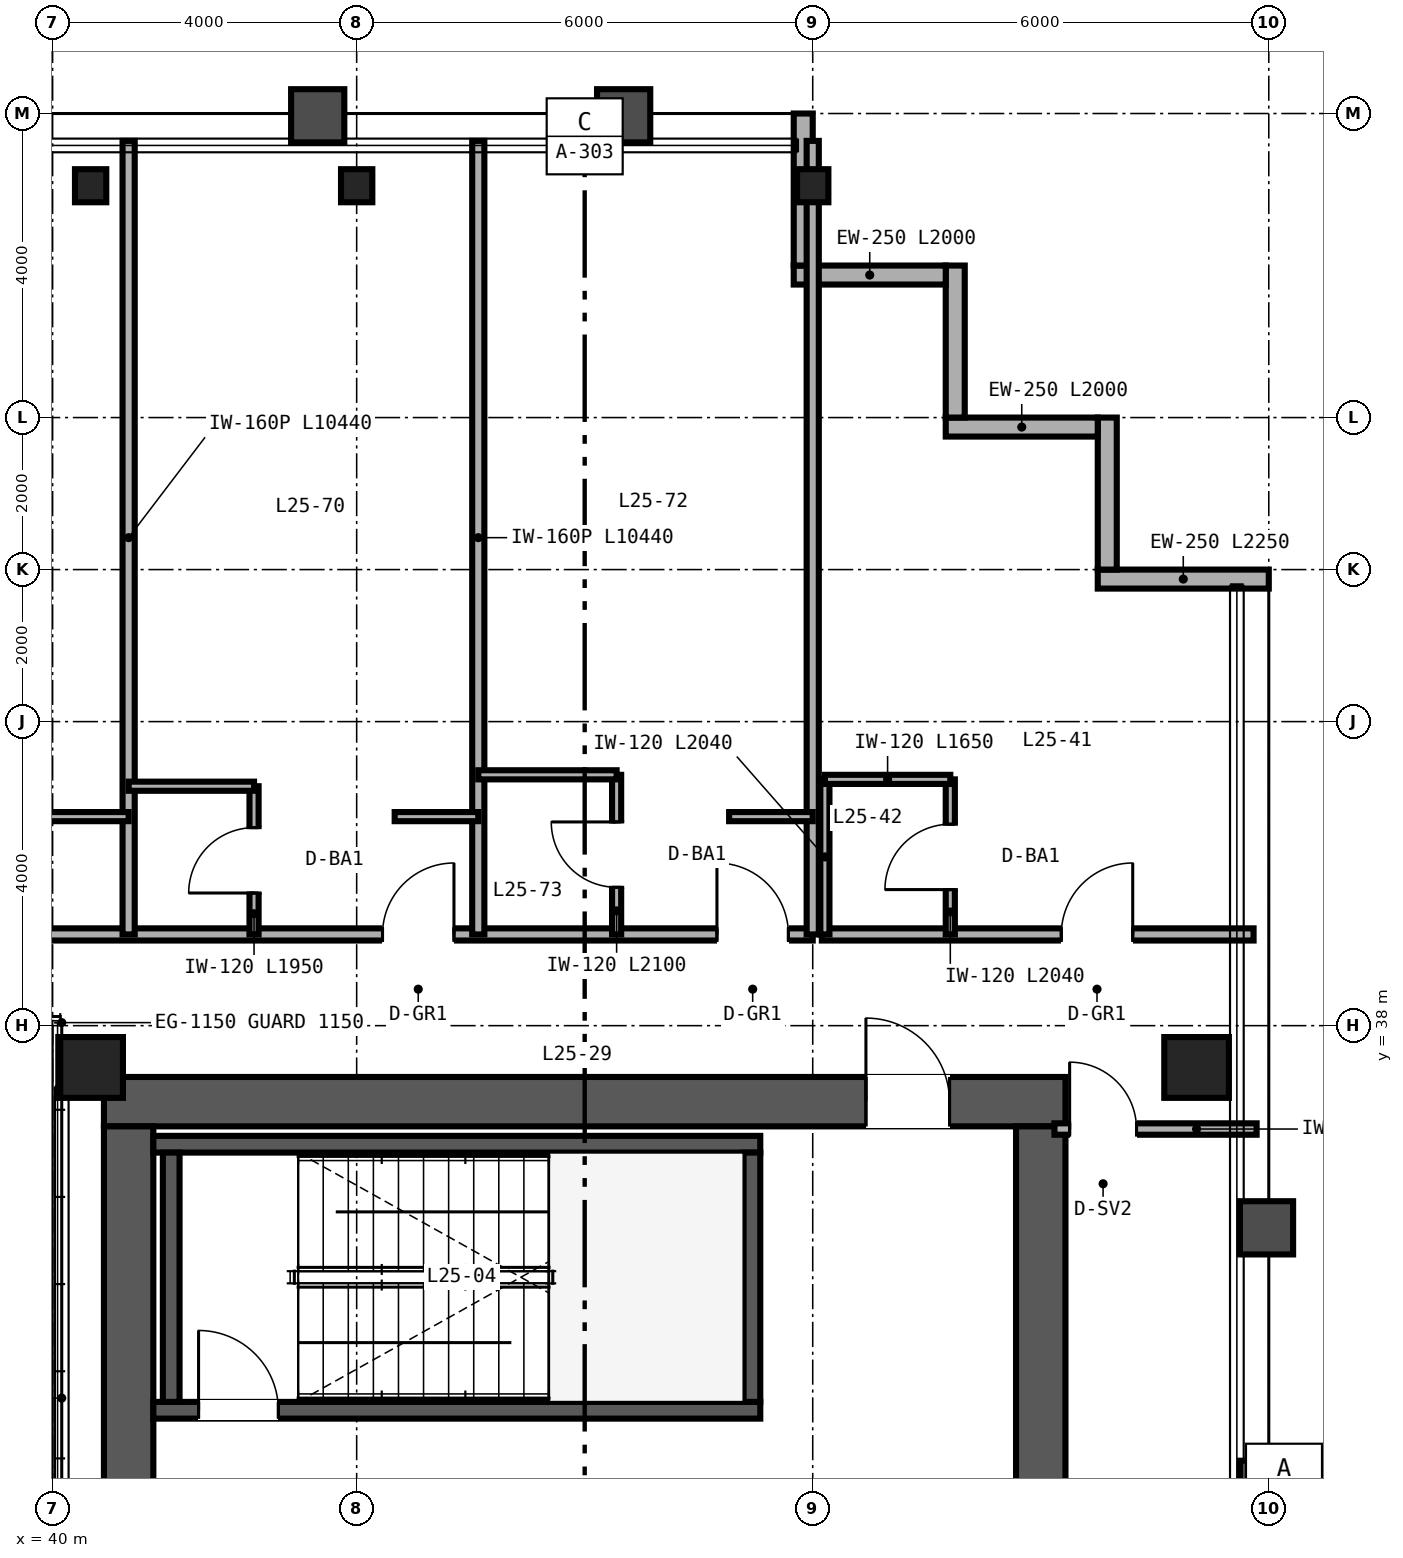
"""IFC4 building model, lengths in metres.
Left out: names, types, materials, properties, quantities, classifications, styles, units other than length and angle.
Written with IfcOpenShell. Run it as: python <this file> out.ifc"""

import sys

from ifc_helpers import new_model, si_unit, direction, frame, frame_2d, origin, origin_2d, place, context, subcontext, project, spatial, rectangle, hollow_rectangle, i_section, extrude, source, transform, mapped, element, fill, save


model = new_model("IFC4")
c1 = context("Model", 3, precision=1e-05, world=origin(), true_north=direction((0.0, 1.0)))
c2 = subcontext(c1, "Body", "Model", "MODEL_VIEW")
j1 = project(units=[si_unit("LENGTHUNIT", "METRE"), si_unit("PLANEANGLEUNIT", "RADIAN")], contexts=[c1])
p1 = place(None, origin())
s1 = spatial("IfcSite", under=j1, at=p1, CompositionType="ELEMENT")
p2 = place(p1, origin())
s2 = spatial("IfcBuilding", under=s1, at=p2, CompositionType="ELEMENT")
p3 = place(p2, frame((0.0, 0.0, 104.4)))
s3 = spatial("IfcBuildingStorey", under=s2, at=p3, CompositionType="ELEMENT", Elevation=104.4)
p4 = place(p3, frame((40.675, 37.0, 0.0), z_axis=(0.0, 0.0, 1.0), x_axis=(1.0, 0.0, 0.0)))
e1 = element("IfcWall", 1, at=p4, inside=s3, PredefinedType="SHEAR", context=c2, shape_type="SweptSolid", body=[
    extrude(rectangle(XDim=12.65, YDim=0.65, at=frame_2d((6.325, 0.0))), origin(), (0.0, 0.0, 1.0), 3.36),
])
p5 = place(p4, frame((10.025, 0.0, 0.0)))
e2 = element("IfcOpeningElement", 2, at=p5, cuts=e1, PredefinedType="OPENING", context=c2, shape_type="SweptSolid", body=[
    extrude(rectangle(XDim=1.1, YDim=2.15, at=frame_2d((0.55, 1.075))), frame((0.0, 0.335, 0.0), z_axis=(0.0, -1.0, 0.0), x_axis=(1.0, 0.0, 0.0)), (0.0, 0.0, 1.0), 0.67),
])
for number, where, z_axis, x_axis in (
    (3, (41.0, 15.325, 0.0), (0.0, 0.0, 1.0), (0.0, 1.0, 0.0)),
    (4, (53.0, 15.325, 0.0), (0.0, 0.0, 1.0), (0.0, 1.0, 0.0)),
):
    element("IfcWall", number, at=place(p3, frame(where, z_axis=z_axis, x_axis=x_axis)), inside=s3, PredefinedType="SHEAR", context=c2, shape_type="SweptSolid", body=[
        extrude(rectangle(XDim=21.35, YDim=0.65, at=frame_2d((10.675, 0.0))), origin(), (0.0, 0.0, 1.0), 3.36),
    ])
p6 = place(p3, frame((41.325, 32.94, 0.0), z_axis=(0.0, 0.0, 1.0), x_axis=(1.0, 0.0, 0.0)))
e5 = element("IfcWall", 5, at=p6, inside=s3, PredefinedType="SHEAR", context=c2, shape_type="SweptSolid", body=[
    extrude(rectangle(XDim=7.985, YDim=0.22, at=frame_2d((3.993, 0.0))), origin(), (0.0, 0.0, 1.0), 3.4),
])
p7 = place(p6, frame((0.595, 0.0, 0.0)))
e6 = element("IfcOpeningElement", 6, at=p7, cuts=e5, PredefinedType="OPENING", context=c2, shape_type="SweptSolid", body=[
    extrude(rectangle(XDim=1.05, YDim=2.15, at=frame_2d((0.525, 1.075))), frame((0.0, 0.12, 0.0), z_axis=(0.0, -1.0, 0.0), x_axis=(1.0, 0.0, 0.0)), (0.0, 0.0, 1.0), 0.24),
])
p8 = place(p3, frame((41.325, 36.44, 0.0), z_axis=(0.0, 0.0, 1.0), x_axis=(1.0, 0.0, 0.0)))
e7 = element("IfcWall", 7, at=p8, inside=s3, PredefinedType="SHEAR", context=c2, shape_type="SweptSolid", body=[
    extrude(rectangle(XDim=7.985, YDim=0.22, at=frame_2d((3.993, 0.0))), origin(), (0.0, 0.0, 1.0), 3.4),
])
for number, where, z_axis, x_axis in (
    (8, (41.56, 33.05, 0.0), (0.0, 0.0, 1.0), (0.0, 1.0, 0.0)),
    (9, (49.2, 33.05, 0.0), (0.0, 0.0, 1.0), (0.0, 1.0, 0.0)),
):
    element("IfcWall", number, at=place(p3, frame(where, z_axis=z_axis, x_axis=x_axis)), inside=s3, PredefinedType="SHEAR", context=c2, shape_type="SweptSolid", body=[
        extrude(rectangle(XDim=3.28, YDim=0.22, at=frame_2d((1.64, 0.0))), origin(), (0.0, 0.0, 1.0), 3.4),
    ])
m1 = source(origin(), c2, "Body", "SweptSolid", [
    extrude(hollow_rectangle(XDim=0.85, YDim=0.8, WallThickness=0.032, at=origin_2d()), origin(), (0.0, 0.0, 1.0), 3.36),
])
for number, where, z_axis, x_axis in (
    (10, (40.5, 37.45, 0.0), (0.0, 0.0, 1.0), (1.0, 0.0, 0.0)),
    (11, (55.05, 37.45, 0.0), (0.0, 0.0, 1.0), (1.0, 0.0, 0.0)),
):
    element("IfcColumn", number, at=place(p3, frame(where, z_axis=z_axis, x_axis=x_axis)), inside=s3, PredefinedType="COLUMN", context=c2, shape_type="MappedRepresentation", body=[
        mapped(m1, transform((0.0, 0.0, 0.0), scale=1.0)),
    ])
m2 = source(origin(), c2, "Body", "SweptSolid", [
    extrude(i_section(OverallWidth=0.412, OverallDepth=0.435, WebThickness=0.036, FlangeThickness=0.057, FilletRadius=0.025, at=origin_2d()), origin(), (0.0, 0.0, 1.0), 3.36),
])
for number, where, z_axis, x_axis in (
    (12, (40.5, 49.05, 0.0), (0.0, 0.0, 1.0), (1.0, 0.0, 0.0)),
    (13, (44.0, 49.05, 0.0), (0.0, 0.0, 1.0), (1.0, 0.0, 0.0)),
    (14, (50.0, 49.05, 0.0), (0.0, 0.0, 1.0), (1.0, 0.0, 0.0)),
):
    element("IfcColumn", number, at=place(p3, frame(where, z_axis=z_axis, x_axis=x_axis)), inside=s3, PredefinedType="COLUMN", context=c2, shape_type="MappedRepresentation", body=[
        mapped(m2, transform((0.0, 0.0, 0.0), scale=1.0)),
    ])
p9 = place(p3, frame((56.0, 43.875, 0.0), z_axis=(0.0, 0.0, 1.0), x_axis=(-1.0, 0.0, 0.0)))
e15 = element("IfcWall", 15, at=p9, inside=s3, PredefinedType="SOLIDWALL", context=c2, shape_type="SweptSolid", body=[
    extrude(rectangle(XDim=2.25, YDim=0.25, at=frame_2d((1.125, 0.0))), origin(), (0.0, 0.0, 1.0), 3.36),
])
for number, where, z_axis, x_axis in (
    (16, (53.875, 44.0, 0.0), (0.0, 0.0, 1.0), (0.0, 1.0, 0.0)),
    (17, (53.75, 45.875, 0.0), (0.0, 0.0, 1.0), (-1.0, 0.0, 0.0)),
    (18, (51.875, 46.0, 0.0), (0.0, 0.0, 1.0), (0.0, 1.0, 0.0)),
    (19, (51.75, 47.875, 0.0), (0.0, 0.0, 1.0), (-1.0, 0.0, 0.0)),
):
    element("IfcWall", number, at=place(p3, frame(where, z_axis=z_axis, x_axis=x_axis)), inside=s3, PredefinedType="SOLIDWALL", context=c2, shape_type="SweptSolid", body=[
        extrude(rectangle(XDim=2.0, YDim=0.25, at=frame_2d((1.0, 0.0))), origin(), (0.0, 0.0, 1.0), 3.36),
    ])
p10 = place(p3, frame((49.875, 48.0, 0.0), z_axis=(0.0, 0.0, 1.0), x_axis=(0.0, 1.0, 0.0)))
e20 = element("IfcWall", 20, at=p10, inside=s3, PredefinedType="SOLIDWALL", context=c2, shape_type="SweptSolid", body=[
    extrude(rectangle(XDim=2.0, YDim=0.25, at=frame_2d((1.0, 0.0))), origin(), (0.0, 0.0, 1.0), 2.667),
])
p11 = place(p3, frame((53.18, 36.64, 0.0), z_axis=(0.0, 0.0, 1.0), x_axis=(1.0, 0.0, 0.0)))
e21 = element("IfcWall", 21, at=p11, inside=s3, PredefinedType="PARTITIONING", context=c2, shape_type="SweptSolid", body=[
    extrude(rectangle(XDim=2.66, YDim=0.15, at=frame_2d((1.33, 0.0))), origin(), (0.0, 0.0, 1.0), 2.743),
])
p12 = place(p11, frame((0.2, 0.0, 0.0)))
e22 = element("IfcOpeningElement", 22, at=p12, cuts=e21, PredefinedType="OPENING", context=c2, shape_type="SweptSolid", body=[
    extrude(rectangle(XDim=0.88, YDim=2.15, at=frame_2d((0.44, 1.075))), frame((0.0, 0.085, 0.0), z_axis=(0.0, -1.0, 0.0), x_axis=(1.0, 0.0, 0.0)), (0.0, 0.0, 1.0), 0.17),
])
p13 = place(p3, frame((50.12, 39.2, 0.0), z_axis=(0.0, 0.0, 1.0), x_axis=(1.0, 0.0, 0.0)))
e23 = element("IfcWall", 23, at=p13, inside=s3, PredefinedType="PARTITIONING", context=c2, shape_type="SweptSolid", body=[
    extrude(rectangle(XDim=5.68, YDim=0.16, at=frame_2d((2.84, 0.0))), origin(), (0.0, 0.0, 1.0), 3.36),
])
p14 = place(p13, frame((3.15, 0.0, 0.0)))
e24 = element("IfcOpeningElement", 24, at=p14, cuts=e23, PredefinedType="OPENING", context=c2, shape_type="SweptSolid", body=[
    extrude(rectangle(XDim=0.94, YDim=2.15, at=frame_2d((0.47, 1.075))), frame((0.0, 0.09, 0.0), z_axis=(0.0, -1.0, 0.0), x_axis=(1.0, 0.0, 0.0)), (0.0, 0.0, 1.0), 0.18),
])
p15 = place(p3, frame((51.81, 39.2, 0.0), z_axis=(0.0, 0.0, 1.0), x_axis=(0.0, 1.0, 0.0)))
e25 = element("IfcWall", 25, at=p15, inside=s3, PredefinedType="PARTITIONING", context=c2, shape_type="SweptSolid", body=[
    extrude(rectangle(XDim=2.04, YDim=0.12, at=frame_2d((1.02, 0.0))), origin(), (0.0, 0.0, 1.0), 3.36),
])
p16 = place(p15, frame((0.59, 0.0, 0.0)))
e26 = element("IfcOpeningElement", 26, at=p16, cuts=e25, PredefinedType="OPENING", context=c2, shape_type="SweptSolid", body=[
    extrude(rectangle(XDim=0.86, YDim=2.1, at=frame_2d((0.43, 1.05))), frame((0.0, 0.07, 0.0), z_axis=(0.0, -1.0, 0.0), x_axis=(1.0, 0.0, 0.0)), (0.0, 0.0, 1.0), 0.14),
])
p17 = place(p3, frame((50.16, 39.2, 0.0), z_axis=(0.0, 0.0, 1.0), x_axis=(0.0, 1.0, 0.0)))
e27 = element("IfcWall", 27, at=p17, inside=s3, PredefinedType="PARTITIONING", context=c2, shape_type="SweptSolid", body=[
    extrude(rectangle(XDim=2.04, YDim=0.12, at=frame_2d((1.02, 0.0))), origin(), (0.0, 0.0, 1.0), 3.36),
])
p18 = place(p3, frame((50.16, 41.24, 0.0), z_axis=(0.0, 0.0, 1.0), x_axis=(1.0, 0.0, 0.0)))
e28 = element("IfcWall", 28, at=p18, inside=s3, PredefinedType="PARTITIONING", context=c2, shape_type="SweptSolid", body=[
    extrude(rectangle(XDim=1.65, YDim=0.12, at=frame_2d((0.825, 0.0))), origin(), (0.0, 0.0, 1.0), 3.36),
])
p19 = place(p3, frame((14.0, 39.2, 0.0), z_axis=(0.0, 0.0, 1.0), x_axis=(1.0, 0.0, 0.0)))
e29 = element("IfcWall", 29, at=p19, inside=s3, PredefinedType="PARTITIONING", context=c2, shape_type="SweptSolid", body=[
    extrude(rectangle(XDim=36.0, YDim=0.16, at=frame_2d((18.0, 0.0))), origin(), (0.0, 0.0, 1.0), 2.581),
])
p20 = place(p19, frame((3.94, 0.0, 0.0)))
e30 = element("IfcOpeningElement", 30, at=p20, cuts=e29, PredefinedType="OPENING", context=c2, shape_type="SweptSolid", body=[
    extrude(rectangle(XDim=0.94, YDim=2.15, at=frame_2d((0.47, 1.075))), frame((0.0, 0.09, 0.0), z_axis=(0.0, -1.0, 0.0), x_axis=(1.0, 0.0, 0.0)), (0.0, 0.0, 1.0), 0.18),
])
p21 = place(p19, frame((7.89, 0.0, 0.0)))
e31 = element("IfcOpeningElement", 31, at=p21, cuts=e29, PredefinedType="OPENING", context=c2, shape_type="SweptSolid", body=[
    extrude(rectangle(XDim=0.94, YDim=2.15, at=frame_2d((0.47, 1.075))), frame((0.0, 0.09, 0.0), z_axis=(0.0, -1.0, 0.0), x_axis=(1.0, 0.0, 0.0)), (0.0, 0.0, 1.0), 0.18),
])
p22 = place(p19, frame((14.94, 0.0, 0.0)))
e32 = element("IfcOpeningElement", 32, at=p22, cuts=e29, PredefinedType="OPENING", context=c2, shape_type="SweptSolid", body=[
    extrude(rectangle(XDim=0.94, YDim=2.15, at=frame_2d((0.47, 1.075))), frame((0.0, 0.09, 0.0), z_axis=(0.0, -1.0, 0.0), x_axis=(1.0, 0.0, 0.0)), (0.0, 0.0, 1.0), 0.18),
])
p23 = place(p19, frame((18.72, 0.0, 0.0)))
e33 = element("IfcOpeningElement", 33, at=p23, cuts=e29, PredefinedType="OPENING", context=c2, shape_type="SweptSolid", body=[
    extrude(rectangle(XDim=0.96, YDim=2.15, at=frame_2d((0.48, 1.075))), frame((0.0, 0.09, 0.0), z_axis=(0.0, -1.0, 0.0), x_axis=(1.0, 0.0, 0.0)), (0.0, 0.0, 1.0), 0.18),
])
p24 = place(p19, frame((24.79, 0.0, 0.0)))
e34 = element("IfcOpeningElement", 34, at=p24, cuts=e29, PredefinedType="OPENING", context=c2, shape_type="SweptSolid", body=[
    extrude(rectangle(XDim=0.94, YDim=2.15, at=frame_2d((0.47, 1.075))), frame((0.0, 0.09, 0.0), z_axis=(0.0, -1.0, 0.0), x_axis=(1.0, 0.0, 0.0)), (0.0, 0.0, 1.0), 0.18),
])
p25 = place(p19, frame((30.34, 0.0, 0.0)))
e35 = element("IfcOpeningElement", 35, at=p25, cuts=e29, PredefinedType="OPENING", context=c2, shape_type="SweptSolid", body=[
    extrude(rectangle(XDim=0.94, YDim=2.15, at=frame_2d((0.47, 1.075))), frame((0.0, 0.09, 0.0), z_axis=(0.0, -1.0, 0.0), x_axis=(1.0, 0.0, 0.0)), (0.0, 0.0, 1.0), 0.18),
])
p26 = place(p19, frame((34.74, 0.0, 0.0)))
e36 = element("IfcOpeningElement", 36, at=p26, cuts=e29, PredefinedType="OPENING", context=c2, shape_type="SweptSolid", body=[
    extrude(rectangle(XDim=0.94, YDim=2.15, at=frame_2d((0.47, 1.075))), frame((0.0, 0.09, 0.0), z_axis=(0.0, -1.0, 0.0), x_axis=(1.0, 0.0, 0.0)), (0.0, 0.0, 1.0), 0.18),
])
p27 = place(p3, frame((50.0, 39.2, 0.0), z_axis=(0.0, 0.0, 1.0), x_axis=(0.0, 1.0, 0.0)))
e37 = element("IfcWall", 37, at=p27, inside=s3, PredefinedType="PARTITIONING", context=c2, shape_type="SweptSolid", body=[
    extrude(rectangle(XDim=10.44, YDim=0.16, at=frame_2d((5.22, 0.0))), origin(), (0.0, 0.0, 1.0), 2.667),
])
p28 = place(p3, frame((41.0, 39.2, 0.0), z_axis=(0.0, 0.0, 1.0), x_axis=(0.0, 1.0, 0.0)))
e38 = element("IfcWall", 38, at=p28, inside=s3, PredefinedType="PARTITIONING", context=c2, shape_type="SweptSolid", body=[
    extrude(rectangle(XDim=10.44, YDim=0.16, at=frame_2d((5.22, 0.0))), origin(), (0.0, 0.0, 1.0), 2.823),
])
p29 = place(p3, frame((39.9, 40.75, 0.0), z_axis=(0.0, 0.0, 1.0), x_axis=(1.0, 0.0, 0.0)))
e39 = element("IfcWall", 39, at=p29, inside=s3, PredefinedType="PARTITIONING", context=c2, shape_type="SweptSolid", body=[
    extrude(rectangle(XDim=1.1, YDim=0.12, at=frame_2d((0.55, 0.0))), origin(), (0.0, 0.0, 1.0), 2.581),
])
p30 = place(p3, frame((45.6, 39.2, 0.0), z_axis=(0.0, 0.0, 1.0), x_axis=(0.0, 1.0, 0.0)))
e40 = element("IfcWall", 40, at=p30, inside=s3, PredefinedType="PARTITIONING", context=c2, shape_type="SweptSolid", body=[
    extrude(rectangle(XDim=10.44, YDim=0.16, at=frame_2d((5.22, 0.0))), origin(), (0.0, 0.0, 1.0), 2.667),
])
p31 = place(p3, frame((42.65, 39.2, 0.0), z_axis=(0.0, 0.0, 1.0), x_axis=(0.0, 1.0, 0.0)))
e41 = element("IfcWall", 41, at=p31, inside=s3, PredefinedType="PARTITIONING", context=c2, shape_type="SweptSolid", body=[
    extrude(rectangle(XDim=1.95, YDim=0.12, at=frame_2d((0.975, 0.0))), origin(), (0.0, 0.0, 1.0), 3.36),
])
p32 = place(p31, frame((0.545, 0.0, 0.0)))
e42 = element("IfcOpeningElement", 42, at=p32, cuts=e41, PredefinedType="OPENING", context=c2, shape_type="SweptSolid", body=[
    extrude(rectangle(XDim=0.86, YDim=2.1, at=frame_2d((0.43, 1.05))), frame((0.0, 0.07, 0.0), z_axis=(0.0, -1.0, 0.0), x_axis=(1.0, 0.0, 0.0)), (0.0, 0.0, 1.0), 0.14),
])
p33 = place(p3, frame((41.0, 41.15, 0.0), z_axis=(0.0, 0.0, 1.0), x_axis=(1.0, 0.0, 0.0)))
e43 = element("IfcWall", 43, at=p33, inside=s3, PredefinedType="PARTITIONING", context=c2, shape_type="SweptSolid", body=[
    extrude(rectangle(XDim=1.65, YDim=0.12, at=frame_2d((0.825, 0.0))), origin(), (0.0, 0.0, 1.0), 3.36),
])
p34 = place(p3, frame((44.5, 40.75, 0.0), z_axis=(0.0, 0.0, 1.0), x_axis=(1.0, 0.0, 0.0)))
e44 = element("IfcWall", 44, at=p34, inside=s3, PredefinedType="PARTITIONING", context=c2, shape_type="SweptSolid", body=[
    extrude(rectangle(XDim=1.1, YDim=0.12, at=frame_2d((0.55, 0.0))), origin(), (0.0, 0.0, 1.0), 3.36),
])
p35 = place(p3, frame((47.42, 39.2, 0.0), z_axis=(0.0, 0.0, 1.0), x_axis=(0.0, 1.0, 0.0)))
e45 = element("IfcWall", 45, at=p35, inside=s3, PredefinedType="PARTITIONING", context=c2, shape_type="SweptSolid", body=[
    extrude(rectangle(XDim=2.1, YDim=0.12, at=frame_2d((1.05, 0.0))), origin(), (0.0, 0.0, 1.0), 3.36),
])
p36 = place(p35, frame((0.62, 0.0, 0.0)))
e46 = element("IfcOpeningElement", 46, at=p36, cuts=e45, PredefinedType="OPENING", context=c2, shape_type="SweptSolid", body=[
    extrude(rectangle(XDim=0.86, YDim=2.1, at=frame_2d((0.43, 1.05))), frame((0.0, 0.07, 0.0), z_axis=(0.0, -1.0, 0.0), x_axis=(1.0, 0.0, 0.0)), (0.0, 0.0, 1.0), 0.14),
])
p37 = place(p3, frame((45.6, 41.3, 0.0), z_axis=(0.0, 0.0, 1.0), x_axis=(1.0, 0.0, 0.0)))
e47 = element("IfcWall", 47, at=p37, inside=s3, PredefinedType="PARTITIONING", context=c2, shape_type="SweptSolid", body=[
    extrude(rectangle(XDim=1.82, YDim=0.12, at=frame_2d((0.91, 0.0))), origin(), (0.0, 0.0, 1.0), 3.36),
])
p38 = place(p3, frame((48.9, 40.75, 0.0), z_axis=(0.0, 0.0, 1.0), x_axis=(1.0, 0.0, 0.0)))
e48 = element("IfcWall", 48, at=p38, inside=s3, PredefinedType="PARTITIONING", context=c2, shape_type="SweptSolid", body=[
    extrude(rectangle(XDim=1.1, YDim=0.12, at=frame_2d((0.55, 0.0))), origin(), (0.0, 0.0, 1.0), 3.36),
])
m3 = source(origin(), c2, "Body", "SweptSolid", [
    extrude(rectangle(XDim=1.05, YDim=2.15, at=frame_2d((0.525, 1.075))), frame((0.0, 0.025, 0.0), z_axis=(0.0, -1.0, 0.0), x_axis=(1.0, 0.0, 0.0)), (0.0, 0.0, 1.0), 0.05),
])
p39 = place(p7, origin())
e49 = element("IfcDoor", 49, at=p39, inside=s3, OperationType="SINGLE_SWING_LEFT", PredefinedType="DOOR", context=c2, shape_type="MappedRepresentation", body=[
    mapped(m3, transform((0.0, 0.0, 0.0), scale=1.0)),
])
fill(e6, e49)
m4 = source(origin(), c2, "Body", "SweptSolid", [
    extrude(rectangle(XDim=1.1, YDim=2.15, at=frame_2d((0.55, 1.075))), frame((0.0, 0.025, 0.0), z_axis=(0.0, -1.0, 0.0), x_axis=(1.0, 0.0, 0.0)), (0.0, 0.0, 1.0), 0.05),
])
p40 = place(p5, origin())
e50 = element("IfcDoor", 50, at=p40, inside=s3, OperationType="SINGLE_SWING_LEFT", PredefinedType="DOOR", context=c2, shape_type="MappedRepresentation", body=[
    mapped(m4, transform((0.0, 0.0, 0.0), scale=1.0)),
])
fill(e2, e50)
m5 = source(origin(), c2, "Body", "SweptSolid", [
    extrude(rectangle(XDim=0.88, YDim=2.15, at=frame_2d((0.44, 1.075))), frame((0.0, 0.025, 0.0), z_axis=(0.0, -1.0, 0.0), x_axis=(1.0, 0.0, 0.0)), (0.0, 0.0, 1.0), 0.05),
])
p41 = place(p12, origin())
e51 = element("IfcDoor", 51, at=p41, inside=s3, OperationType="SINGLE_SWING_LEFT", PredefinedType="DOOR", context=c2, shape_type="MappedRepresentation", body=[
    mapped(m5, transform((0.0, 0.0, 0.0), scale=1.0)),
])
fill(e22, e51)
m6 = source(origin(), c2, "Body", "SweptSolid", [
    extrude(rectangle(XDim=0.86, YDim=2.1, at=frame_2d((0.43, 1.05))), frame((0.0, 0.025, 0.0), z_axis=(0.0, -1.0, 0.0), x_axis=(1.0, 0.0, 0.0)), (0.0, 0.0, 1.0), 0.05),
])
p42 = place(p16, origin())
e52 = element("IfcDoor", 52, at=p42, inside=s3, OperationType="SINGLE_SWING_LEFT", PredefinedType="DOOR", context=c2, shape_type="MappedRepresentation", body=[
    mapped(m6, transform((0.0, 0.0, 0.0), scale=1.0)),
])
fill(e26, e52)
m7 = source(origin(), c2, "Body", "SweptSolid", [
    extrude(rectangle(XDim=0.94, YDim=2.15, at=frame_2d((0.47, 1.075))), frame((0.0, 0.025, 0.0), z_axis=(0.0, -1.0, 0.0), x_axis=(1.0, 0.0, 0.0)), (0.0, 0.0, 1.0), 0.05),
])
p43 = place(p14, origin())
e53 = element("IfcDoor", 53, at=p43, inside=s3, OperationType="SINGLE_SWING_RIGHT", PredefinedType="DOOR", context=c2, shape_type="MappedRepresentation", body=[
    mapped(m7, transform((0.0, 0.0, 0.0), scale=1.0)),
])
fill(e24, e53)
p44 = place(p32, origin())
e54 = element("IfcDoor", 54, at=p44, inside=s3, OperationType="SINGLE_SWING_LEFT", PredefinedType="DOOR", context=c2, shape_type="MappedRepresentation", body=[
    mapped(m6, transform((0.0, 0.0, 0.0), scale=1.0)),
])
fill(e42, e54)
p45 = place(p36, origin())
e55 = element("IfcDoor", 55, at=p45, inside=s3, OperationType="SINGLE_SWING_RIGHT", PredefinedType="DOOR", context=c2, shape_type="MappedRepresentation", body=[
    mapped(m6, transform((0.0, 0.0, 0.0), scale=1.0)),
])
fill(e46, e55)
p46 = place(p25, origin())
e56 = element("IfcDoor", 56, at=p46, inside=s3, OperationType="SINGLE_SWING_RIGHT", PredefinedType="DOOR", context=c2, shape_type="MappedRepresentation", body=[
    mapped(m7, transform((0.0, 0.0, 0.0), scale=1.0)),
])
fill(e35, e56)
p47 = place(p26, origin())
e57 = element("IfcDoor", 57, at=p47, inside=s3, OperationType="SINGLE_SWING_LEFT", PredefinedType="DOOR", context=c2, shape_type="MappedRepresentation", body=[
    mapped(m7, transform((0.0, 0.0, 0.0), scale=1.0)),
])
fill(e36, e57)
save(model, sys.argv[1])
